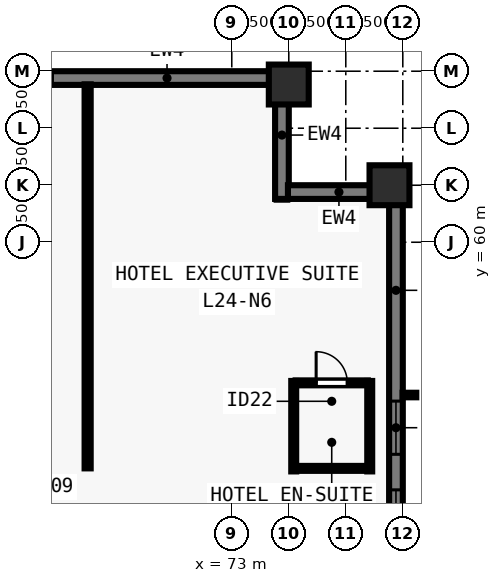
"""IFC4 building model, lengths in metres.
Left out: names, types, materials, properties, quantities, classifications, styles, units other than length and angle.
Written with IfcOpenShell. Run it as: python <this file> out.ifc"""

import sys

from ifc_helpers import new_model, si_unit, direction, frame, frame_2d, origin, origin_2d, place, context, subcontext, project, spatial, rectangle, extrude, element, fill, save


model = new_model("IFC4")
c1 = context("Model", 3, precision=1e-05, world=origin(), true_north=direction((0.0, 1.0)))
c2 = subcontext(c1, "Body", "Model", "MODEL_VIEW")
j1 = project(units=[si_unit("LENGTHUNIT", "METRE"), si_unit("PLANEANGLEUNIT", "RADIAN")], contexts=[c1])
p1 = place(None, origin())
s1 = spatial("IfcSite", under=j1, at=p1, CompositionType="ELEMENT")
p2 = place(p1, origin())
s2 = spatial("IfcBuilding", under=s1, at=p2, CompositionType="ELEMENT")
p3 = place(p2, frame((0.0, 0.0, 90.0)))
s3 = spatial("IfcBuildingStorey", under=s2, at=p3, CompositionType="ELEMENT", Elevation=90.0)
for number, where, z_axis, x_axis in (
    (1, (77.15, 61.5, 0.0), (0.0, 0.0, 1.0), (0.0, 1.0, 0.0)),
    (2, (74.5, 64.15, 0.0), (0.0, 0.0, 1.0), (1.0, 0.0, 0.0)),
):
    element("IfcColumn", number, at=place(p3, frame(where, z_axis=z_axis, x_axis=x_axis)), inside=s3, PredefinedType="COLUMN", context=c2, shape_type="SweptSolid", body=[
        extrude(rectangle(XDim=1.05, YDim=1.05, at=origin_2d()), origin(), (0.0, 0.0, 1.0), 3.5),
    ])
p4 = place(p3, frame((63.6, 64.32, 0.0), z_axis=(0.0, 0.0, 1.0), x_axis=(1.0, 0.0, 0.0)))
e3 = element("IfcWall", 3, at=p4, inside=s3, PredefinedType="SOLIDWALL", context=c2, shape_type="SweptSolid", body=[
    extrude(rectangle(XDim=10.562, YDim=0.36, at=frame_2d((5.281, 0.0))), origin(), (0.0, 0.0, 1.0), 3.28),
])
p5 = place(p4, frame((3.281, 0.0, 0.8)))
e4 = element("IfcOpeningElement", 4, at=p5, cuts=e3, PredefinedType="OPENING", context=c2, shape_type="SweptSolid", body=[
    extrude(rectangle(XDim=1.4, YDim=1.544, at=frame_2d((0.7, 0.772))), frame((0.0, 0.19, 0.0), z_axis=(0.0, -1.0, 0.0), x_axis=(1.0, 0.0, 0.0)), (0.0, 0.0, 1.0), 0.38),
])
p6 = place(p3, frame((74.32, 64.5, 0.0), z_axis=(0.0, 0.0, 1.0), x_axis=(0.0, -1.0, 0.0)))
e5 = element("IfcWall", 5, at=p6, inside=s3, PredefinedType="SOLIDWALL", context=c2, shape_type="SweptSolid", body=[
    extrude(rectangle(XDim=3.36, YDim=0.36, at=frame_2d((1.68, 0.0))), origin(), (0.0, 0.0, 1.0), 3.28),
])
p7 = place(p3, frame((74.478, 61.32, 0.0), z_axis=(0.0, 0.0, 1.0), x_axis=(1.0, 0.0, 0.0)))
e6 = element("IfcWall", 6, at=p7, inside=s3, PredefinedType="SOLIDWALL", context=c2, shape_type="SweptSolid", body=[
    extrude(rectangle(XDim=2.684, YDim=0.36, at=frame_2d((1.342, 0.0))), origin(), (0.0, 0.0, 1.0), 3.28),
])
p8 = place(p3, frame((77.32, 61.5, 0.0), z_axis=(0.0, 0.0, 1.0), x_axis=(0.0, -1.0, 0.0)))
e7 = element("IfcWall", 7, at=p8, inside=s3, PredefinedType="SOLIDWALL", context=c2, shape_type="SweptSolid", body=[
    extrude(rectangle(XDim=44.662, YDim=0.36, at=frame_2d((22.331, 0.0))), origin(), (0.0, 0.0, 1.0), 3.28),
])
p9 = place(p8, frame((5.68, 0.0, 0.8)))
e8 = element("IfcOpeningElement", 8, at=p9, cuts=e7, PredefinedType="OPENING", context=c2, shape_type="SweptSolid", body=[
    extrude(rectangle(XDim=1.4, YDim=1.544, at=frame_2d((0.7, 0.772))), frame((0.0, 0.19, 0.0), z_axis=(0.0, -1.0, 0.0), x_axis=(1.0, 0.0, 0.0)), (0.0, 0.0, 1.0), 0.38),
])
p10 = place(p8, frame((8.015, 0.0, 0.8)))
e9 = element("IfcOpeningElement", 9, at=p10, cuts=e7, PredefinedType="OPENING", context=c2, shape_type="SweptSolid", body=[
    extrude(rectangle(XDim=1.75, YDim=1.544, at=frame_2d((0.875, 0.772))), frame((0.0, 0.19, 0.0), z_axis=(0.0, -1.0, 0.0), x_axis=(1.0, 0.0, 0.0)), (0.0, 0.0, 1.0), 0.38),
])
p11 = place(p8, frame((11.551, 0.0, 0.8)))
e10 = element("IfcOpeningElement", 10, at=p11, cuts=e7, PredefinedType="OPENING", context=c2, shape_type="SweptSolid", body=[
    extrude(rectangle(XDim=1.4, YDim=1.544, at=frame_2d((0.7, 0.772))), frame((0.0, 0.19, 0.0), z_axis=(0.0, -1.0, 0.0), x_axis=(1.0, 0.0, 0.0)), (0.0, 0.0, 1.0), 0.38),
])
p12 = place(p8, frame((14.736, 0.0, 0.8)))
e11 = element("IfcOpeningElement", 11, at=p12, cuts=e7, PredefinedType="OPENING", context=c2, shape_type="SweptSolid", body=[
    extrude(rectangle(XDim=1.75, YDim=1.544, at=frame_2d((0.875, 0.772))), frame((0.0, 0.19, 0.0), z_axis=(0.0, -1.0, 0.0), x_axis=(1.0, 0.0, 0.0)), (0.0, 0.0, 1.0), 0.38),
])
p13 = place(p8, frame((19.521, 0.0, 0.8)))
e12 = element("IfcOpeningElement", 12, at=p13, cuts=e7, PredefinedType="OPENING", context=c2, shape_type="SweptSolid", body=[
    extrude(rectangle(XDim=1.4, YDim=1.544, at=frame_2d((0.7, 0.772))), frame((0.0, 0.19, 0.0), z_axis=(0.0, -1.0, 0.0), x_axis=(1.0, 0.0, 0.0)), (0.0, 0.0, 1.0), 0.38),
])
p14 = place(p8, frame((21.456, 0.0, 0.8)))
e13 = element("IfcOpeningElement", 13, at=p14, cuts=e7, PredefinedType="OPENING", context=c2, shape_type="SweptSolid", body=[
    extrude(rectangle(XDim=1.75, YDim=1.544, at=frame_2d((0.875, 0.772))), frame((0.0, 0.19, 0.0), z_axis=(0.0, -1.0, 0.0), x_axis=(1.0, 0.0, 0.0)), (0.0, 0.0, 1.0), 0.38),
])
p15 = place(p8, frame((23.741, 0.0, 0.8)))
e14 = element("IfcOpeningElement", 14, at=p15, cuts=e7, PredefinedType="OPENING", context=c2, shape_type="SweptSolid", body=[
    extrude(rectangle(XDim=1.4, YDim=1.544, at=frame_2d((0.7, 0.772))), frame((0.0, 0.19, 0.0), z_axis=(0.0, -1.0, 0.0), x_axis=(1.0, 0.0, 0.0)), (0.0, 0.0, 1.0), 0.38),
])
p16 = place(p8, frame((28.177, 0.0, 0.8)))
e15 = element("IfcOpeningElement", 15, at=p16, cuts=e7, PredefinedType="OPENING", context=c2, shape_type="SweptSolid", body=[
    extrude(rectangle(XDim=1.75, YDim=1.544, at=frame_2d((0.875, 0.772))), frame((0.0, 0.19, 0.0), z_axis=(0.0, -1.0, 0.0), x_axis=(1.0, 0.0, 0.0)), (0.0, 0.0, 1.0), 0.38),
])
p17 = place(p8, frame((31.711, 0.0, 0.8)))
e16 = element("IfcOpeningElement", 16, at=p17, cuts=e7, PredefinedType="OPENING", context=c2, shape_type="SweptSolid", body=[
    extrude(rectangle(XDim=1.4, YDim=1.544, at=frame_2d((0.7, 0.772))), frame((0.0, 0.19, 0.0), z_axis=(0.0, -1.0, 0.0), x_axis=(1.0, 0.0, 0.0)), (0.0, 0.0, 1.0), 0.38),
])
p18 = place(p8, frame((34.897, 0.0, 0.8)))
e17 = element("IfcOpeningElement", 17, at=p18, cuts=e7, PredefinedType="OPENING", context=c2, shape_type="SweptSolid", body=[
    extrude(rectangle(XDim=1.75, YDim=1.544, at=frame_2d((0.875, 0.772))), frame((0.0, 0.19, 0.0), z_axis=(0.0, -1.0, 0.0), x_axis=(1.0, 0.0, 0.0)), (0.0, 0.0, 1.0), 0.38),
])
p19 = place(p8, frame((38.432, 0.0, 0.8)))
e18 = element("IfcOpeningElement", 18, at=p19, cuts=e7, PredefinedType="OPENING", context=c2, shape_type="SweptSolid", body=[
    extrude(rectangle(XDim=1.4, YDim=1.544, at=frame_2d((0.7, 0.772))), frame((0.0, 0.19, 0.0), z_axis=(0.0, -1.0, 0.0), x_axis=(1.0, 0.0, 0.0)), (0.0, 0.0, 1.0), 0.38),
])
p20 = place(p3, frame((69.208, 54.05, 0.0), z_axis=(0.0, 0.0, 1.0), x_axis=(0.0, 1.0, 0.0)))
e19 = element("IfcWall", 19, at=p20, inside=s3, PredefinedType="PARTITIONING", context=c2, shape_type="SweptSolid", body=[
    extrude(rectangle(XDim=10.105, YDim=0.16, at=frame_2d((5.052, 0.0))), origin(), (0.0, 0.0, 1.0), 2.439),
])
for number, where, z_axis, x_axis in (
    (20, (76.63, 53.97, 0.0), (0.0, 0.0, 1.0), (0.0, 1.0, 0.0)),
    (21, (74.63, 53.97, 0.0), (0.0, 0.0, 1.0), (0.0, 1.0, 0.0)),
):
    element("IfcWall", number, at=place(p3, frame(where, z_axis=z_axis, x_axis=x_axis)), inside=s3, PredefinedType="PLUMBINGWALL", context=c2, shape_type="SweptSolid", body=[
        extrude(rectangle(XDim=2.38, YDim=0.13, at=frame_2d((1.19, 0.0))), origin(), (0.0, 0.0, 1.0), 3.28),
    ])
p21 = place(p3, frame((74.68, 56.3, 0.0), z_axis=(0.0, 0.0, 1.0), x_axis=(1.0, 0.0, 0.0)))
e22 = element("IfcWall", 22, at=p21, inside=s3, PredefinedType="PLUMBINGWALL", context=c2, shape_type="SweptSolid", body=[
    extrude(rectangle(XDim=1.9, YDim=0.13, at=frame_2d((0.95, 0.0))), origin(), (0.0, 0.0, 1.0), 3.28),
])
p22 = place(p21, frame((0.54, 0.0, 0.0)))
e23 = element("IfcOpeningElement", 23, at=p22, cuts=e22, PredefinedType="OPENING", context=c2, shape_type="SweptSolid", body=[
    extrude(rectangle(XDim=0.82, YDim=2.1, at=frame_2d((0.41, 1.05))), frame((0.0, 0.075, 0.0), z_axis=(0.0, -1.0, 0.0), x_axis=(1.0, 0.0, 0.0)), (0.0, 0.0, 1.0), 0.15),
])
p23 = place(p3, frame((74.68, 54.05, 0.0), z_axis=(0.0, 0.0, 1.0), x_axis=(1.0, 0.0, 0.0)))
e24 = element("IfcWall", 24, at=p23, inside=s3, PredefinedType="PLUMBINGWALL", context=c2, shape_type="SweptSolid", body=[
    extrude(rectangle(XDim=1.9, YDim=0.13, at=frame_2d((0.95, 0.0))), origin(), (0.0, 0.0, 1.0), 3.28),
])
p24 = place(p9, origin())
e25 = element("IfcWindow", 25, at=p24, inside=s3, PartitioningType="SINGLE_PANEL", PredefinedType="WINDOW", context=c2, shape_type="SweptSolid", body=[
    extrude(rectangle(XDim=1.4, YDim=1.544, at=frame_2d((0.7, 0.772))), frame((0.0, -0.05, 0.0), z_axis=(0.0, -1.0, 0.0), x_axis=(1.0, 0.0, 0.0)), (0.0, 0.0, 1.0), 0.06),
])
fill(e8, e25)
p25 = place(p10, origin())
e26 = element("IfcWindow", 26, at=p25, inside=s3, PartitioningType="SINGLE_PANEL", PredefinedType="WINDOW", context=c2, shape_type="SweptSolid", body=[
    extrude(rectangle(XDim=1.75, YDim=1.544, at=frame_2d((0.875, 0.772))), frame((0.0, -0.05, 0.0), z_axis=(0.0, -1.0, 0.0), x_axis=(1.0, 0.0, 0.0)), (0.0, 0.0, 1.0), 0.06),
])
fill(e9, e26)
p26 = place(p22, origin())
e27 = element("IfcDoor", 27, at=p26, inside=s3, OperationType="SINGLE_SWING_LEFT", PredefinedType="DOOR", context=c2, shape_type="SweptSolid", body=[
    extrude(rectangle(XDim=0.82, YDim=2.1, at=frame_2d((0.41, 1.05))), frame((0.0, 0.025, 0.0), z_axis=(0.0, -1.0, 0.0), x_axis=(1.0, 0.0, 0.0)), (0.0, 0.0, 1.0), 0.05),
])
fill(e23, e27)
save(model, sys.argv[1])
